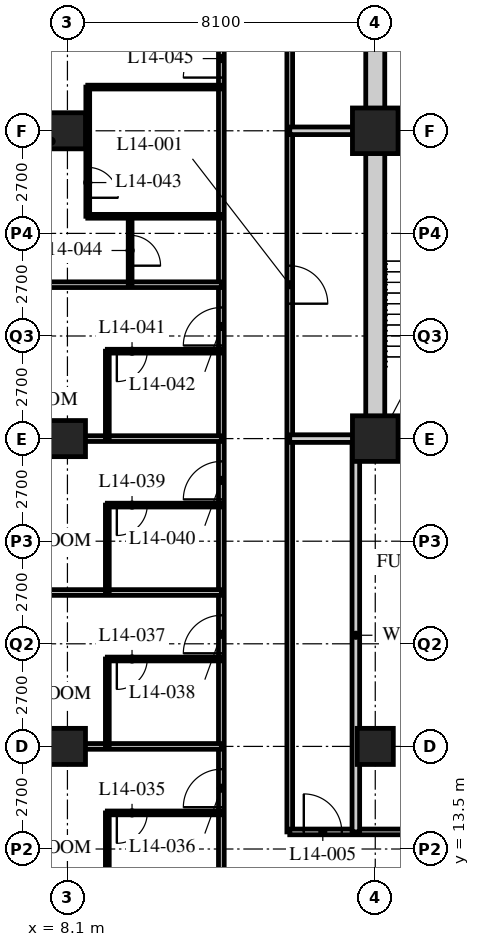
"""IFC4 building model, lengths in metres.
Left out: names, types, materials, properties, quantities, classifications, styles, units other than length and angle.
Written with IfcOpenShell. Run it as: python <this file> out.ifc"""

import sys

from ifc_helpers import new_model, si_unit, direction, frame, frame_2d, origin, origin_2d, place, context, subcontext, project, spatial, rectangle, hollow_rectangle, extrude, element, fill, save


model = new_model("IFC4")
c1 = context("Model", 3, precision=1e-05, world=origin(), true_north=direction((0.0, 1.0)))
c2 = subcontext(c1, "Body", "Model", "MODEL_VIEW")
j1 = project(units=[si_unit("LENGTHUNIT", "METRE"), si_unit("PLANEANGLEUNIT", "RADIAN")], contexts=[c1])
p1 = place(None, origin())
s1 = spatial("IfcSite", under=j1, at=p1, CompositionType="ELEMENT")
p2 = place(p1, origin())
s2 = spatial("IfcBuilding", under=s1, at=p2, CompositionType="ELEMENT")
p3 = place(p2, frame((0.0, 0.0, 60.2)))
s3 = spatial("IfcBuildingStorey", under=s2, at=p3, CompositionType="ELEMENT", Elevation=60.2)
for number, where, z_axis, x_axis in (
    (1, (8.1, 16.2, 0.0), (0.0, 0.0, 1.0), (1.0, 0.0, 0.0)),
    (2, (8.1, 24.3, 0.0), (0.0, 0.0, 1.0), (1.0, 0.0, 0.0)),
    (3, (8.1, 32.4, 0.0), (0.0, 0.0, 1.0), (1.0, 0.0, 0.0)),
    (4, (16.2, 16.2, 0.0), (0.0, 0.0, 1.0), (1.0, 0.0, 0.0)),
):
    element("IfcColumn", number, at=place(p3, frame(where, z_axis=z_axis, x_axis=x_axis)), inside=s3, PredefinedType="COLUMN", context=c2, shape_type="SweptSolid", body=[
        extrude(hollow_rectangle(XDim=0.95, YDim=0.95, WallThickness=0.095, at=origin_2d()), origin(), (0.0, 0.0, 1.0), 3.4),
    ])
for number, where, z_axis, x_axis in (
    (5, (16.2, 24.3, 0.0), (0.0, 0.0, 1.0), (1.0, 0.0, 0.0)),
    (6, (16.2, 32.4, 0.0), (0.0, 0.0, 1.0), (1.0, 0.0, 0.0)),
):
    element("IfcColumn", number, at=place(p3, frame(where, z_axis=z_axis, x_axis=x_axis)), inside=s3, PredefinedType="COLUMN", context=c2, shape_type="SweptSolid", body=[
        extrude(hollow_rectangle(XDim=1.2, YDim=1.2, WallThickness=0.12, at=origin_2d()), origin(), (0.0, 0.0, 1.0), 3.4),
    ])
p4 = place(p3, frame((12.15, 12.15, 0.0), z_axis=(0.0, 0.0, 1.0), x_axis=(0.0, 1.0, 0.0)))
e7 = element("IfcWall", 7, at=p4, inside=s3, PredefinedType="PARTITIONING", context=c2, shape_type="SweptSolid", body=[
    extrude(rectangle(XDim=30.15, YDim=0.15, at=frame_2d((15.075, 0.0))), origin(), (0.0, 0.0, 1.0), 3.19),
])
p5 = place(p4, frame((2.45, 0.0, 0.0)))
e8 = element("IfcOpeningElement", 8, at=p5, cuts=e7, PredefinedType="OPENING", context=c2, shape_type="SweptSolid", body=[
    extrude(rectangle(XDim=1.0, YDim=2.1, at=frame_2d((0.5, 1.05))), frame((0.0, 0.085, 0.0), z_axis=(0.0, -1.0, 0.0), x_axis=(1.0, 0.0, 0.0)), (0.0, 0.0, 1.0), 0.17),
])
p6 = place(p4, frame((6.5, 0.0, 0.0)))
e9 = element("IfcOpeningElement", 9, at=p6, cuts=e7, PredefinedType="OPENING", context=c2, shape_type="SweptSolid", body=[
    extrude(rectangle(XDim=1.0, YDim=2.1, at=frame_2d((0.5, 1.05))), frame((0.0, 0.085, 0.0), z_axis=(0.0, -1.0, 0.0), x_axis=(1.0, 0.0, 0.0)), (0.0, 0.0, 1.0), 0.17),
])
p7 = place(p4, frame((10.55, 0.0, 0.0)))
e10 = element("IfcOpeningElement", 10, at=p7, cuts=e7, PredefinedType="OPENING", context=c2, shape_type="SweptSolid", body=[
    extrude(rectangle(XDim=1.0, YDim=2.1, at=frame_2d((0.5, 1.05))), frame((0.0, 0.085, 0.0), z_axis=(0.0, -1.0, 0.0), x_axis=(1.0, 0.0, 0.0)), (0.0, 0.0, 1.0), 0.17),
])
p8 = place(p4, frame((14.6, 0.0, 0.0)))
e11 = element("IfcOpeningElement", 11, at=p8, cuts=e7, PredefinedType="OPENING", context=c2, shape_type="SweptSolid", body=[
    extrude(rectangle(XDim=1.0, YDim=2.1, at=frame_2d((0.5, 1.05))), frame((0.0, 0.085, 0.0), z_axis=(0.0, -1.0, 0.0), x_axis=(1.0, 0.0, 0.0)), (0.0, 0.0, 1.0), 0.17),
])
p9 = place(p4, frame((21.65, 0.0, 0.0)))
e12 = element("IfcOpeningElement", 12, at=p9, cuts=e7, PredefinedType="OPENING", context=c2, shape_type="SweptSolid", body=[
    extrude(rectangle(XDim=1.0, YDim=2.1, at=frame_2d((0.5, 1.05))), frame((0.0, 0.085, 0.0), z_axis=(0.0, -1.0, 0.0), x_axis=(1.0, 0.0, 0.0)), (0.0, 0.0, 1.0), 0.17),
])
p10 = place(p4, frame((26.7, 0.0, 0.0)))
e13 = element("IfcOpeningElement", 13, at=p10, cuts=e7, PredefinedType="OPENING", context=c2, shape_type="SweptSolid", body=[
    extrude(rectangle(XDim=1.0, YDim=2.1, at=frame_2d((0.5, 1.05))), frame((0.0, 0.085, 0.0), z_axis=(0.0, -1.0, 0.0), x_axis=(1.0, 0.0, 0.0)), (0.0, 0.0, 1.0), 0.17),
])
p11 = place(p3, frame((13.95, 40.5, 0.0), z_axis=(0.0, 0.0, 1.0), x_axis=(0.0, -1.0, 0.0)))
e14 = element("IfcWall", 14, at=p11, inside=s3, PredefinedType="PARTITIONING", context=c2, shape_type="SweptSolid", body=[
    extrude(rectangle(XDim=26.55, YDim=0.15, at=frame_2d((13.275, 0.0))), origin(), (0.0, 0.0, 1.0), 3.19),
])
p12 = place(p11, frame((11.65, 0.0, 0.0)))
e15 = element("IfcOpeningElement", 15, at=p12, cuts=e14, PredefinedType="OPENING", context=c2, shape_type="SweptSolid", body=[
    extrude(rectangle(XDim=1.0, YDim=2.1, at=frame_2d((0.5, 1.05))), frame((0.0, 0.085, 0.0), z_axis=(0.0, -1.0, 0.0), x_axis=(1.0, 0.0, 0.0)), (0.0, 0.0, 1.0), 0.17),
])
p13 = place(p11, frame((3.55, 0.0, 0.0)))
e16 = element("IfcOpeningElement", 16, at=p13, cuts=e14, PredefinedType="OPENING", context=c2, shape_type="SweptSolid", body=[
    extrude(rectangle(XDim=1.0, YDim=2.1, at=frame_2d((0.5, 1.05))), frame((0.0, 0.085, 0.0), z_axis=(0.0, -1.0, 0.0), x_axis=(1.0, 0.0, 0.0)), (0.0, 0.0, 1.0), 0.17),
])
p14 = place(p3, frame((13.95, 13.95, 0.0), z_axis=(0.0, 0.0, 1.0), x_axis=(1.0, 0.0, 0.0)))
e17 = element("IfcWall", 17, at=p14, inside=s3, PredefinedType="PARTITIONING", context=c2, shape_type="SweptSolid", body=[
    extrude(rectangle(XDim=13.19, YDim=0.15, at=frame_2d((6.595, 0.0))), origin(), (0.0, 0.0, 1.0), 3.19),
])
p15 = place(p14, frame((0.37, 0.0, 0.0)))
e18 = element("IfcOpeningElement", 18, at=p15, cuts=e17, PredefinedType="OPENING", context=c2, shape_type="SweptSolid", body=[
    extrude(rectangle(XDim=1.0, YDim=2.1, at=frame_2d((0.5, 1.05))), frame((0.0, 0.085, 0.0), z_axis=(0.0, -1.0, 0.0), x_axis=(1.0, 0.0, 0.0)), (0.0, 0.0, 1.0), 0.17),
])
p16 = place(p14, frame((4.104, 0.0, 0.0)))
e19 = element("IfcOpeningElement", 19, at=p16, cuts=e17, PredefinedType="OPENING", context=c2, shape_type="SweptSolid", body=[
    extrude(rectangle(XDim=1.0, YDim=2.1, at=frame_2d((0.5, 1.05))), frame((0.0, 0.085, 0.0), z_axis=(0.0, -1.0, 0.0), x_axis=(1.0, 0.0, 0.0)), (0.0, 0.0, 1.0), 0.17),
])
p17 = place(p14, frame((9.835, 0.0, 0.0)))
e20 = element("IfcOpeningElement", 20, at=p17, cuts=e17, PredefinedType="OPENING", context=c2, shape_type="SweptSolid", body=[
    extrude(rectangle(XDim=1.0, YDim=2.1, at=frame_2d((0.5, 1.05))), frame((0.0, 0.085, 0.0), z_axis=(0.0, -1.0, 0.0), x_axis=(1.0, 0.0, 0.0)), (0.0, 0.0, 1.0), 0.17),
])
p18 = place(p3, frame((13.95, 32.4, 0.0), z_axis=(0.0, 0.0, 1.0), x_axis=(1.0, 0.0, 0.0)))
e21 = element("IfcWall", 21, at=p18, inside=s3, PredefinedType="SOLIDWALL", context=c2, shape_type="SweptSolid", body=[
    extrude(rectangle(XDim=2.25, YDim=0.2, at=frame_2d((1.125, 0.0))), origin(), (0.0, 0.0, 1.0), 2.578),
])
p19 = place(p3, frame((15.689, 13.95, 0.0), z_axis=(0.0, 0.0, 1.0), x_axis=(0.0, 1.0, 0.0)))
e22 = element("IfcWall", 22, at=p19, inside=s3, PredefinedType="SOLIDWALL", context=c2, shape_type="SweptSolid", body=[
    extrude(rectangle(XDim=10.35, YDim=0.2, at=frame_2d((5.175, 0.0))), origin(), (0.0, 0.0, 1.0), 3.19),
])
p20 = place(p3, frame((13.95, 24.3, 0.0), z_axis=(0.0, 0.0, 1.0), x_axis=(1.0, 0.0, 0.0)))
e23 = element("IfcWall", 23, at=p20, inside=s3, PredefinedType="SOLIDWALL", context=c2, shape_type="SweptSolid", body=[
    extrude(rectangle(XDim=2.25, YDim=0.2, at=frame_2d((1.125, 0.0))), origin(), (0.0, 0.0, 1.0), 2.578),
])
p21 = place(p3, frame((9.15, 12.15, 0.0), z_axis=(0.0, 0.0, 1.0), x_axis=(0.0, 1.0, 0.0)))
e24 = element("IfcWall", 24, at=p21, inside=s3, PredefinedType="PARTITIONING", context=c2, shape_type="SweptSolid", body=[
    extrude(rectangle(XDim=2.3, YDim=0.1, at=frame_2d((1.15, 0.0))), origin(), (0.0, 0.0, 1.0), 3.19),
])
p22 = place(p3, frame((12.15, 14.45, 0.0), z_axis=(0.0, 0.0, 1.0), x_axis=(-1.0, 0.0, 0.0)))
e25 = element("IfcWall", 25, at=p22, inside=s3, PredefinedType="PARTITIONING", context=c2, shape_type="SweptSolid", body=[
    extrude(rectangle(XDim=3.0, YDim=0.1, at=frame_2d((1.5, 0.0))), origin(), (0.0, 0.0, 1.0), 3.19),
])
p23 = place(p22, frame((1.95, 0.0, 0.0)))
e26 = element("IfcOpeningElement", 26, at=p23, cuts=e25, PredefinedType="OPENING", context=c2, shape_type="SweptSolid", body=[
    extrude(rectangle(XDim=0.8, YDim=2.1, at=frame_2d((0.4, 1.05))), frame((0.0, 0.06, 0.0), z_axis=(0.0, -1.0, 0.0), x_axis=(1.0, 0.0, 0.0)), (0.0, 0.0, 1.0), 0.12),
])
p24 = place(p3, frame((12.15, 16.2, 0.0), z_axis=(0.0, 0.0, 1.0), x_axis=(-1.0, 0.0, 0.0)))
e27 = element("IfcWall", 27, at=p24, inside=s3, PredefinedType="PARTITIONING", context=c2, shape_type="SweptSolid", body=[
    extrude(rectangle(XDim=11.85, YDim=0.15, at=frame_2d((5.925, 0.0))), origin(), (0.0, 0.0, 1.0), 2.578),
])
p25 = place(p3, frame((9.15, 16.2, 0.0), z_axis=(0.0, 0.0, 1.0), x_axis=(0.0, 1.0, 0.0)))
e28 = element("IfcWall", 28, at=p25, inside=s3, PredefinedType="PARTITIONING", context=c2, shape_type="SweptSolid", body=[
    extrude(rectangle(XDim=2.3, YDim=0.1, at=frame_2d((1.15, 0.0))), origin(), (0.0, 0.0, 1.0), 3.19),
])
p26 = place(p3, frame((12.15, 18.5, 0.0), z_axis=(0.0, 0.0, 1.0), x_axis=(-1.0, 0.0, 0.0)))
e29 = element("IfcWall", 29, at=p26, inside=s3, PredefinedType="PARTITIONING", context=c2, shape_type="SweptSolid", body=[
    extrude(rectangle(XDim=3.0, YDim=0.1, at=frame_2d((1.5, 0.0))), origin(), (0.0, 0.0, 1.0), 3.19),
])
p27 = place(p26, frame((1.95, 0.0, 0.0)))
e30 = element("IfcOpeningElement", 30, at=p27, cuts=e29, PredefinedType="OPENING", context=c2, shape_type="SweptSolid", body=[
    extrude(rectangle(XDim=0.8, YDim=2.1, at=frame_2d((0.4, 1.05))), frame((0.0, 0.06, 0.0), z_axis=(0.0, -1.0, 0.0), x_axis=(1.0, 0.0, 0.0)), (0.0, 0.0, 1.0), 0.12),
])
p28 = place(p3, frame((12.15, 20.25, 0.0), z_axis=(0.0, 0.0, 1.0), x_axis=(-1.0, 0.0, 0.0)))
e31 = element("IfcWall", 31, at=p28, inside=s3, PredefinedType="PARTITIONING", context=c2, shape_type="SweptSolid", body=[
    extrude(rectangle(XDim=11.85, YDim=0.15, at=frame_2d((5.925, 0.0))), origin(), (0.0, 0.0, 1.0), 3.19),
])
p29 = place(p3, frame((9.15, 20.25, 0.0), z_axis=(0.0, 0.0, 1.0), x_axis=(0.0, 1.0, 0.0)))
e32 = element("IfcWall", 32, at=p29, inside=s3, PredefinedType="PARTITIONING", context=c2, shape_type="SweptSolid", body=[
    extrude(rectangle(XDim=2.3, YDim=0.1, at=frame_2d((1.15, 0.0))), origin(), (0.0, 0.0, 1.0), 3.19),
])
p30 = place(p3, frame((12.15, 22.55, 0.0), z_axis=(0.0, 0.0, 1.0), x_axis=(-1.0, 0.0, 0.0)))
e33 = element("IfcWall", 33, at=p30, inside=s3, PredefinedType="PARTITIONING", context=c2, shape_type="SweptSolid", body=[
    extrude(rectangle(XDim=3.0, YDim=0.1, at=frame_2d((1.5, 0.0))), origin(), (0.0, 0.0, 1.0), 3.19),
])
p31 = place(p30, frame((1.95, 0.0, 0.0)))
e34 = element("IfcOpeningElement", 34, at=p31, cuts=e33, PredefinedType="OPENING", context=c2, shape_type="SweptSolid", body=[
    extrude(rectangle(XDim=0.8, YDim=2.1, at=frame_2d((0.4, 1.05))), frame((0.0, 0.06, 0.0), z_axis=(0.0, -1.0, 0.0), x_axis=(1.0, 0.0, 0.0)), (0.0, 0.0, 1.0), 0.12),
])
p32 = place(p3, frame((12.15, 24.3, 0.0), z_axis=(0.0, 0.0, 1.0), x_axis=(-1.0, 0.0, 0.0)))
e35 = element("IfcWall", 35, at=p32, inside=s3, PredefinedType="PARTITIONING", context=c2, shape_type="SweptSolid", body=[
    extrude(rectangle(XDim=11.85, YDim=0.15, at=frame_2d((5.925, 0.0))), origin(), (0.0, 0.0, 1.0), 2.578),
])
p33 = place(p3, frame((9.15, 24.3, 0.0), z_axis=(0.0, 0.0, 1.0), x_axis=(0.0, 1.0, 0.0)))
e36 = element("IfcWall", 36, at=p33, inside=s3, PredefinedType="PARTITIONING", context=c2, shape_type="SweptSolid", body=[
    extrude(rectangle(XDim=2.3, YDim=0.1, at=frame_2d((1.15, 0.0))), origin(), (0.0, 0.0, 1.0), 3.19),
])
p34 = place(p3, frame((12.15, 26.6, 0.0), z_axis=(0.0, 0.0, 1.0), x_axis=(-1.0, 0.0, 0.0)))
e37 = element("IfcWall", 37, at=p34, inside=s3, PredefinedType="PARTITIONING", context=c2, shape_type="SweptSolid", body=[
    extrude(rectangle(XDim=3.0, YDim=0.1, at=frame_2d((1.5, 0.0))), origin(), (0.0, 0.0, 1.0), 3.19),
])
p35 = place(p34, frame((1.95, 0.0, 0.0)))
e38 = element("IfcOpeningElement", 38, at=p35, cuts=e37, PredefinedType="OPENING", context=c2, shape_type="SweptSolid", body=[
    extrude(rectangle(XDim=0.8, YDim=2.1, at=frame_2d((0.4, 1.05))), frame((0.0, 0.06, 0.0), z_axis=(0.0, -1.0, 0.0), x_axis=(1.0, 0.0, 0.0)), (0.0, 0.0, 1.0), 0.12),
])
p36 = place(p3, frame((12.15, 28.35, 0.0), z_axis=(0.0, 0.0, 1.0), x_axis=(-1.0, 0.0, 0.0)))
e39 = element("IfcWall", 39, at=p36, inside=s3, PredefinedType="PARTITIONING", context=c2, shape_type="SweptSolid", body=[
    extrude(rectangle(XDim=11.85, YDim=0.15, at=frame_2d((5.925, 0.0))), origin(), (0.0, 0.0, 1.0), 3.19),
])
p37 = place(p3, frame((8.635, 30.15, 0.0), z_axis=(0.0, 0.0, 1.0), x_axis=(0.0, 1.0, 0.0)))
e40 = element("IfcWall", 40, at=p37, inside=s3, PredefinedType="PARTITIONING", context=c2, shape_type="SweptSolid", body=[
    extrude(rectangle(XDim=3.4, YDim=0.1, at=frame_2d((1.7, 0.0))), origin(), (0.0, 0.0, 1.0), 3.19),
])
p38 = place(p37, frame((0.488, 0.0, 0.0)))
e41 = element("IfcOpeningElement", 41, at=p38, cuts=e40, PredefinedType="OPENING", context=c2, shape_type="SweptSolid", body=[
    extrude(rectangle(XDim=0.8, YDim=2.1, at=frame_2d((0.4, 1.05))), frame((0.0, 0.06, 0.0), z_axis=(0.0, -1.0, 0.0), x_axis=(1.0, 0.0, 0.0)), (0.0, 0.0, 1.0), 0.12),
])
p39 = place(p3, frame((9.75, 28.35, 0.0), z_axis=(0.0, 0.0, 1.0), x_axis=(0.0, 1.0, 0.0)))
e42 = element("IfcWall", 42, at=p39, inside=s3, PredefinedType="PARTITIONING", context=c2, shape_type="SweptSolid", body=[
    extrude(rectangle(XDim=1.8, YDim=0.1, at=frame_2d((0.9, 0.0))), origin(), (0.0, 0.0, 1.0), 3.19),
])
p40 = place(p39, frame((0.5, 0.0, 0.0)))
e43 = element("IfcOpeningElement", 43, at=p40, cuts=e42, PredefinedType="OPENING", context=c2, shape_type="SweptSolid", body=[
    extrude(rectangle(XDim=0.8, YDim=2.1, at=frame_2d((0.4, 1.05))), frame((0.0, 0.06, 0.0), z_axis=(0.0, -1.0, 0.0), x_axis=(1.0, 0.0, 0.0)), (0.0, 0.0, 1.0), 0.12),
])
for number, where, z_axis, x_axis in (
    (44, (12.15, 30.15, 0.0), (0.0, 0.0, 1.0), (-1.0, 0.0, 0.0)),
    (45, (12.15, 33.55, 0.0), (0.0, 0.0, 1.0), (-1.0, 0.0, 0.0)),
):
    element("IfcWall", number, at=place(p3, frame(where, z_axis=z_axis, x_axis=x_axis)), inside=s3, PredefinedType="PARTITIONING", context=c2, shape_type="SweptSolid", body=[
        extrude(rectangle(XDim=3.515, YDim=0.1, at=frame_2d((1.757, 0.0))), origin(), (0.0, 0.0, 1.0), 3.19),
    ])
p41 = place(p3, frame((15.95, 24.3, 0.0), z_axis=(0.0, 0.0, 1.0), x_axis=(1.0, 0.0, 0.0)))
e46 = element("IfcWall", 46, at=p41, inside=s3, PredefinedType="SOLIDWALL", context=c2, shape_type="SweptSolid", body=[
    extrude(rectangle(XDim=24.8, YDim=0.5, at=frame_2d((12.4, 0.0))), origin(), (0.0, 0.0, 1.0), 2.54),
])
p42 = place(p41, frame((11.5, 0.0, 0.0)))
e47 = element("IfcOpeningElement", 47, at=p42, cuts=e46, PredefinedType="OPENING", context=c2, shape_type="SweptSolid", body=[
    extrude(rectangle(XDim=1.8, YDim=2.4, at=frame_2d((0.9, 1.2))), frame((0.0, 0.26, 0.0), z_axis=(0.0, -1.0, 0.0), x_axis=(1.0, 0.0, 0.0)), (0.0, 0.0, 1.0), 0.52),
])
p43 = place(p3, frame((16.2, 24.55, 0.0), z_axis=(0.0, 0.0, 1.0), x_axis=(0.0, 1.0, 0.0)))
e48 = element("IfcWall", 48, at=p43, inside=s3, PredefinedType="SOLIDWALL", context=c2, shape_type="SweptSolid", body=[
    extrude(rectangle(XDim=15.7, YDim=0.5, at=frame_2d((7.85, 0.0))), origin(), (0.0, 0.0, 1.0), 2.578),
])
p44 = place(p3, frame((16.45, 32.4, 0.0), z_axis=(0.0, 0.0, 1.0), x_axis=(1.0, 0.0, 0.0)))
e49 = element("IfcWall", 49, at=p44, inside=s3, PredefinedType="SOLIDWALL", context=c2, shape_type="SweptSolid", body=[
    extrude(rectangle(XDim=7.95, YDim=0.2, at=frame_2d((3.975, 0.0))), origin(), (0.0, 0.0, 1.0), 2.578),
])
p45 = place(p12, origin())
e50 = element("IfcDoor", 50, at=p45, inside=s3, OperationType="SINGLE_SWING_RIGHT", PredefinedType="DOOR", context=c2, shape_type="SweptSolid", body=[
    extrude(rectangle(XDim=1.0, YDim=2.1, at=frame_2d((0.5, 1.05))), frame((0.0, 0.025, 0.0), z_axis=(0.0, -1.0, 0.0), x_axis=(1.0, 0.0, 0.0)), (0.0, 0.0, 1.0), 0.05),
])
fill(e15, e50)
p46 = place(p15, origin())
e51 = element("IfcDoor", 51, at=p46, inside=s3, OperationType="SINGLE_SWING_LEFT", PredefinedType="DOOR", context=c2, shape_type="SweptSolid", body=[
    extrude(rectangle(XDim=1.0, YDim=2.1, at=frame_2d((0.5, 1.05))), frame((0.0, 0.025, 0.0), z_axis=(0.0, -1.0, 0.0), x_axis=(1.0, 0.0, 0.0)), (0.0, 0.0, 1.0), 0.05),
])
fill(e18, e51)
p47 = place(p23, origin())
e52 = element("IfcDoor", 52, at=p47, inside=s3, OperationType="SINGLE_SWING_RIGHT", PredefinedType="DOOR", context=c2, shape_type="SweptSolid", body=[
    extrude(rectangle(XDim=0.8, YDim=2.1, at=frame_2d((0.4, 1.05))), frame((0.0, 0.025, 0.0), z_axis=(0.0, -1.0, 0.0), x_axis=(1.0, 0.0, 0.0)), (0.0, 0.0, 1.0), 0.05),
])
fill(e26, e52)
p48 = place(p5, origin())
e53 = element("IfcDoor", 53, at=p48, inside=s3, OperationType="SINGLE_SWING_LEFT", PredefinedType="DOOR", context=c2, shape_type="SweptSolid", body=[
    extrude(rectangle(XDim=1.0, YDim=2.1, at=frame_2d((0.5, 1.05))), frame((0.0, 0.025, 0.0), z_axis=(0.0, -1.0, 0.0), x_axis=(1.0, 0.0, 0.0)), (0.0, 0.0, 1.0), 0.05),
])
fill(e8, e53)
p49 = place(p27, origin())
e54 = element("IfcDoor", 54, at=p49, inside=s3, OperationType="SINGLE_SWING_RIGHT", PredefinedType="DOOR", context=c2, shape_type="SweptSolid", body=[
    extrude(rectangle(XDim=0.8, YDim=2.1, at=frame_2d((0.4, 1.05))), frame((0.0, 0.025, 0.0), z_axis=(0.0, -1.0, 0.0), x_axis=(1.0, 0.0, 0.0)), (0.0, 0.0, 1.0), 0.05),
])
fill(e30, e54)
p50 = place(p6, origin())
e55 = element("IfcDoor", 55, at=p50, inside=s3, OperationType="SINGLE_SWING_LEFT", PredefinedType="DOOR", context=c2, shape_type="SweptSolid", body=[
    extrude(rectangle(XDim=1.0, YDim=2.1, at=frame_2d((0.5, 1.05))), frame((0.0, 0.025, 0.0), z_axis=(0.0, -1.0, 0.0), x_axis=(1.0, 0.0, 0.0)), (0.0, 0.0, 1.0), 0.05),
])
fill(e9, e55)
p51 = place(p31, origin())
e56 = element("IfcDoor", 56, at=p51, inside=s3, OperationType="SINGLE_SWING_RIGHT", PredefinedType="DOOR", context=c2, shape_type="SweptSolid", body=[
    extrude(rectangle(XDim=0.8, YDim=2.1, at=frame_2d((0.4, 1.05))), frame((0.0, 0.025, 0.0), z_axis=(0.0, -1.0, 0.0), x_axis=(1.0, 0.0, 0.0)), (0.0, 0.0, 1.0), 0.05),
])
fill(e34, e56)
p52 = place(p7, origin())
e57 = element("IfcDoor", 57, at=p52, inside=s3, OperationType="SINGLE_SWING_LEFT", PredefinedType="DOOR", context=c2, shape_type="SweptSolid", body=[
    extrude(rectangle(XDim=1.0, YDim=2.1, at=frame_2d((0.5, 1.05))), frame((0.0, 0.025, 0.0), z_axis=(0.0, -1.0, 0.0), x_axis=(1.0, 0.0, 0.0)), (0.0, 0.0, 1.0), 0.05),
])
fill(e10, e57)
p53 = place(p35, origin())
e58 = element("IfcDoor", 58, at=p53, inside=s3, OperationType="SINGLE_SWING_RIGHT", PredefinedType="DOOR", context=c2, shape_type="SweptSolid", body=[
    extrude(rectangle(XDim=0.8, YDim=2.1, at=frame_2d((0.4, 1.05))), frame((0.0, 0.025, 0.0), z_axis=(0.0, -1.0, 0.0), x_axis=(1.0, 0.0, 0.0)), (0.0, 0.0, 1.0), 0.05),
])
fill(e38, e58)
p54 = place(p8, origin())
e59 = element("IfcDoor", 59, at=p54, inside=s3, OperationType="SINGLE_SWING_LEFT", PredefinedType="DOOR", context=c2, shape_type="SweptSolid", body=[
    extrude(rectangle(XDim=1.0, YDim=2.1, at=frame_2d((0.5, 1.05))), frame((0.0, 0.025, 0.0), z_axis=(0.0, -1.0, 0.0), x_axis=(1.0, 0.0, 0.0)), (0.0, 0.0, 1.0), 0.05),
])
fill(e11, e59)
p55 = place(p38, origin())
e60 = element("IfcDoor", 60, at=p55, inside=s3, OperationType="SINGLE_SWING_RIGHT", PredefinedType="DOOR", context=c2, shape_type="SweptSolid", body=[
    extrude(rectangle(XDim=0.8, YDim=2.1, at=frame_2d((0.4, 1.05))), frame((0.0, 0.025, 0.0), z_axis=(0.0, -1.0, 0.0), x_axis=(1.0, 0.0, 0.0)), (0.0, 0.0, 1.0), 0.05),
])
fill(e41, e60)
p56 = place(p40, origin())
e61 = element("IfcDoor", 61, at=p56, inside=s3, OperationType="SINGLE_SWING_RIGHT", PredefinedType="DOOR", context=c2, shape_type="SweptSolid", body=[
    extrude(rectangle(XDim=0.8, YDim=2.1, at=frame_2d((0.4, 1.05))), frame((0.0, 0.025, 0.0), z_axis=(0.0, -1.0, 0.0), x_axis=(1.0, 0.0, 0.0)), (0.0, 0.0, 1.0), 0.05),
])
fill(e43, e61)
p57 = place(p9, origin())
e62 = element("IfcDoor", 62, at=p57, inside=s3, OperationType="SINGLE_SWING_LEFT", PredefinedType="DOOR", context=c2, shape_type="SweptSolid", body=[
    extrude(rectangle(XDim=1.0, YDim=2.1, at=frame_2d((0.5, 1.05))), frame((0.0, 0.025, 0.0), z_axis=(0.0, -1.0, 0.0), x_axis=(1.0, 0.0, 0.0)), (0.0, 0.0, 1.0), 0.05),
])
fill(e12, e62)
save(model, sys.argv[1])
